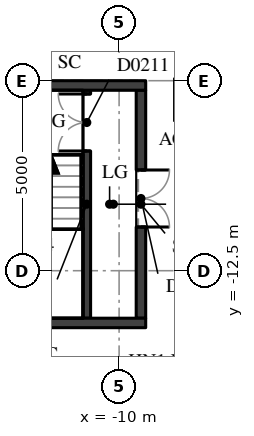
"""IFC4 building model, lengths in metres.
Left out: names, types, materials, properties, quantities, classifications, styles, units other than length and angle.
Written with IfcOpenShell. Run it as: python <this file> out.ifc"""

import sys

from ifc_helpers import new_model, si_unit, direction, frame, frame_2d, origin, place, context, subcontext, project, spatial, rectangle, extrude, element, fill, save


model = new_model("IFC4")
c1 = context("Model", 3, precision=1e-05, world=origin(), true_north=direction((0.0, 1.0)))
c2 = subcontext(c1, "Body", "Model", "MODEL_VIEW")
j1 = project(units=[si_unit("LENGTHUNIT", "METRE"), si_unit("PLANEANGLEUNIT", "RADIAN")], contexts=[c1])
p1 = place(None, origin())
s1 = spatial("IfcSite", under=j1, at=p1, CompositionType="ELEMENT")
p2 = place(p1, origin())
s2 = spatial("IfcBuilding", under=s1, at=p2, CompositionType="ELEMENT")
p3 = place(p2, frame((0.0, 0.0, 12.5)))
s3 = spatial("IfcBuildingStorey", under=s2, at=p3, CompositionType="ELEMENT", Elevation=12.5)
p4 = place(p3, frame((-10.85, -13.75, 0.0), z_axis=(0.0, 0.0, 1.0), x_axis=(0.0, 1.0, 0.0)))
e1 = element("IfcWall", 1, at=p4, inside=s3, PredefinedType="SHEAR", context=c2, shape_type="SweptSolid", body=[
    extrude(rectangle(XDim=6.0, YDim=0.2, at=frame_2d((3.0, 0.0))), origin(), (0.0, 0.0, 1.0), 4.65),
])
p5 = place(p4, frame((4.4, 0.0, 0.0)))
e2 = element("IfcOpeningElement", 2, at=p5, cuts=e1, PredefinedType="OPENING", context=c2, shape_type="SweptSolid", body=[
    extrude(rectangle(XDim=1.5, YDim=2.1, at=frame_2d((0.75, 1.05))), frame((0.0, 0.11, 0.0), z_axis=(0.0, -1.0, 0.0), x_axis=(1.0, 0.0, 0.0)), (0.0, 0.0, 1.0), 0.22),
])
p6 = place(p3, frame((-9.425, -13.75, -0.41), z_axis=(0.0, 0.0, 1.0), x_axis=(0.0, 1.0, 0.0)))
e3 = element("IfcWall", 3, at=p6, inside=s3, PredefinedType="SHEAR", context=c2, shape_type="SweptSolid", body=[
    extrude(rectangle(XDim=6.0, YDim=0.25, at=frame_2d((3.0, 0.0))), origin(), (0.0, 0.0, 1.0), 5.06),
])
p7 = place(p6, frame((2.4, 0.0, 0.41)))
e4 = element("IfcOpeningElement", 4, at=p7, cuts=e3, PredefinedType="OPENING", context=c2, shape_type="SweptSolid", body=[
    extrude(rectangle(XDim=1.5, YDim=2.1, at=frame_2d((0.75, 1.05))), frame((0.0, 0.135, 0.0), z_axis=(0.0, -1.0, 0.0), x_axis=(1.0, 0.0, 0.0)), (0.0, 0.0, 1.0), 0.27),
])
for number, where, z_axis, x_axis in (
    (5, (-14.5, -7.625, -0.41), (0.0, 0.0, 1.0), (1.0, 0.0, 0.0)),
    (6, (-14.5, -13.875, -0.41), (0.0, 0.0, 1.0), (1.0, 0.0, 0.0)),
):
    element("IfcWall", number, at=place(p3, frame(where, z_axis=z_axis, x_axis=x_axis)), inside=s3, PredefinedType="SHEAR", context=c2, shape_type="SweptSolid", body=[
        extrude(rectangle(XDim=5.2, YDim=0.25, at=frame_2d((2.6, 0.0))), origin(), (0.0, 0.0, 1.0), 5.06),
    ])
p8 = place(p5, origin())
e7 = element("IfcDoor", 7, at=p8, inside=s3, OperationType="DOUBLE_DOOR_SINGLE_SWING", PredefinedType="DOOR", context=c2, shape_type="SweptSolid", body=[
    extrude(rectangle(XDim=1.5, YDim=2.1, at=frame_2d((0.75, 1.05))), frame((0.0, 0.025, 0.0), z_axis=(0.0, -1.0, 0.0), x_axis=(1.0, 0.0, 0.0)), (0.0, 0.0, 1.0), 0.05),
])
fill(e2, e7)
p9 = place(p7, origin())
e8 = element("IfcDoor", 8, at=p9, inside=s3, OperationType="DOUBLE_DOOR_SINGLE_SWING", PredefinedType="DOOR", context=c2, shape_type="SweptSolid", body=[
    extrude(rectangle(XDim=1.5, YDim=2.1, at=frame_2d((0.75, 1.05))), frame((0.0, 0.025, 0.0), z_axis=(0.0, -1.0, 0.0), x_axis=(1.0, 0.0, 0.0)), (0.0, 0.0, 1.0), 0.05),
])
fill(e4, e8)
save(model, sys.argv[1])
